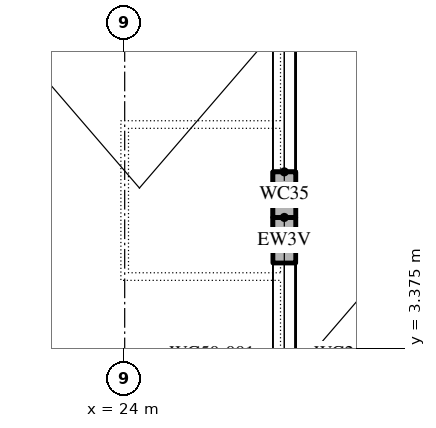
"""IFC4 building model, lengths in metres.
Left out: names, types, materials, properties, quantities, classifications, styles, units other than length and angle.
Written with IfcOpenShell. Run it as: python <this file> out.ifc"""

import sys

from ifc_helpers import new_model, si_unit, direction, frame, frame_2d, origin, place, context, subcontext, project, spatial, polyline, rectangle, outline, extrude, element, fill, save


model = new_model("IFC4")
c1 = context("Model", 3, precision=1e-05, world=origin(), true_north=direction((0.0, 1.0)))
c2 = subcontext(c1, "Body", "Model", "MODEL_VIEW")
j1 = project(units=[si_unit("LENGTHUNIT", "METRE"), si_unit("PLANEANGLEUNIT", "RADIAN")], contexts=[c1])
p1 = place(None, origin())
s1 = spatial("IfcSite", under=j1, at=p1, CompositionType="ELEMENT")
p2 = place(p1, origin())
s2 = spatial("IfcBuilding", under=s1, at=p2, CompositionType="ELEMENT")
p3 = place(p2, frame((0.0, 0.0, 394.2)))
s3 = spatial("IfcBuildingStorey", under=s2, at=p3, CompositionType="ELEMENT", Elevation=394.2)
p4 = place(p3, frame((26.1, -2.1, 0.0), z_axis=(0.0, 0.0, 1.0), x_axis=(0.0, 1.0, 0.0)))
e1 = element("IfcWall", 1, at=p4, inside=s3, PredefinedType="STANDARD", context=c2, shape_type="SweptSolid", body=[
    extrude(rectangle(XDim=7.198, YDim=0.3, at=frame_2d((3.599, 0.0))), origin(), (0.0, 0.0, 1.0), 4.0),
])
p5 = place(p4, frame((0.6, 0.0, 0.8)))
e2 = element("IfcOpeningElement", 2, at=p5, cuts=e1, PredefinedType="OPENING", context=c2, shape_type="SweptSolid", body=[
    extrude(outline(polyline([(0.0, 0.0), (2.4, 0.0), (2.4, 1.25), (2.377, 1.488), (2.31, 1.717), (2.2, 1.929), (2.051, 2.116), (1.87, 2.272), (1.663, 2.391), (1.437, 2.468), (1.2, 2.5), (0.963, 2.468), (0.737, 2.391), (0.53, 2.272), (0.349, 2.116), (0.2, 1.929), (0.09, 1.717), (0.023, 1.488), (0.0, 1.25), (0.0, 0.0)])), frame((0.0, 0.16, 0.0), z_axis=(0.0, -1.0, 0.0), x_axis=(1.0, 0.0, 0.0)), (0.0, 0.0, 1.0), 0.32),
])
p6 = place(p4, frame((4.198, 0.0, 0.8)))
e3 = element("IfcOpeningElement", 3, at=p6, cuts=e1, PredefinedType="OPENING", context=c2, shape_type="SweptSolid", body=[
    extrude(outline(polyline([(0.0, 0.0), (2.4, 0.0), (2.4, 1.25), (2.377, 1.488), (2.31, 1.717), (2.2, 1.929), (2.051, 2.116), (1.87, 2.272), (1.663, 2.391), (1.437, 2.468), (1.2, 2.5), (0.963, 2.468), (0.737, 2.391), (0.53, 2.272), (0.349, 2.116), (0.2, 1.929), (0.09, 1.717), (0.023, 1.488), (0.0, 1.25), (0.0, 0.0)])), frame((0.0, 0.16, 0.0), z_axis=(0.0, -1.0, 0.0), x_axis=(1.0, 0.0, 0.0)), (0.0, 0.0, 1.0), 0.32),
])
p7 = place(p3, frame((26.1, -2.1, 4.0), z_axis=(0.0, 0.0, 1.0), x_axis=(0.0, 1.0, 0.0)))
e4 = element("IfcWall", 4, at=p7, inside=s3, PredefinedType="STANDARD", context=c2, shape_type="SweptSolid", body=[
    extrude(outline(polyline([(0.0, 0.0), (7.198, 0.0), (7.198, 7.809), (0.0, 12.664), (0.0, 0.0)])), frame((0.0, 0.15, 0.0), z_axis=(0.0, -1.0, 0.0), x_axis=(1.0, 0.0, 0.0)), (0.0, 0.0, 1.0), 0.3),
])
p8 = place(p7, frame((0.3, 0.0, 1.0)))
e5 = element("IfcOpeningElement", 5, at=p8, cuts=e4, PredefinedType="OPENING", context=c2, shape_type="SweptSolid", body=[
    extrude(outline(polyline([(0.0, 0.0), (3.0, 0.0), (3.0, 4.902), (2.974, 5.294), (2.898, 5.678), (2.772, 6.05), (2.598, 6.402), (2.38, 6.728), (2.121, 7.023), (1.826, 7.282), (1.5, 7.5), (1.174, 7.282), (0.879, 7.023), (0.62, 6.728), (0.402, 6.402), (0.228, 6.05), (0.102, 5.678), (0.026, 5.294), (0.0, 4.902), (0.0, 0.0)])), frame((0.0, 0.16, 0.0), z_axis=(0.0, -1.0, 0.0), x_axis=(1.0, 0.0, 0.0)), (0.0, 0.0, 1.0), 0.32),
])
p9 = place(p7, frame((3.898, 0.0, 1.0)))
e6 = element("IfcOpeningElement", 6, at=p9, cuts=e4, PredefinedType="OPENING", context=c2, shape_type="SweptSolid", body=[
    extrude(outline(polyline([(0.0, 0.0), (3.0, 0.0), (3.0, 2.5), (2.974, 2.882), (2.897, 3.256), (2.771, 3.617), (2.596, 3.958), (2.378, 4.272), (2.119, 4.553), (1.825, 4.798), (1.5, 5.0), (1.175, 4.798), (0.881, 4.553), (0.622, 4.272), (0.404, 3.958), (0.229, 3.617), (0.103, 3.256), (0.026, 2.882), (0.0, 2.5), (0.0, 0.0)])), frame((0.0, 0.16, 0.0), z_axis=(0.0, -1.0, 0.0), x_axis=(1.0, 0.0, 0.0)), (0.0, 0.0, 1.0), 0.32),
])
p10 = place(p3, frame((26.1, 5.098, 0.0), z_axis=(0.0, 0.0, 1.0), x_axis=(0.0, 1.0, 0.0)))
e7 = element("IfcWall", 7, at=p10, inside=s3, PredefinedType="STANDARD", context=c2, shape_type="SweptSolid", body=[
    extrude(rectangle(XDim=7.198, YDim=0.3, at=frame_2d((3.599, 0.0))), origin(), (0.0, 0.0, 1.0), 4.0),
])
p11 = place(p10, frame((0.6, 0.0, 0.8)))
e8 = element("IfcOpeningElement", 8, at=p11, cuts=e7, PredefinedType="OPENING", context=c2, shape_type="SweptSolid", body=[
    extrude(outline(polyline([(0.0, 0.0), (2.4, 0.0), (2.4, 1.25), (2.377, 1.488), (2.31, 1.717), (2.2, 1.929), (2.051, 2.116), (1.87, 2.272), (1.663, 2.391), (1.437, 2.468), (1.2, 2.5), (0.963, 2.468), (0.737, 2.391), (0.53, 2.272), (0.349, 2.116), (0.2, 1.929), (0.09, 1.717), (0.023, 1.488), (0.0, 1.25), (0.0, 0.0)])), frame((0.0, 0.16, 0.0), z_axis=(0.0, -1.0, 0.0), x_axis=(1.0, 0.0, 0.0)), (0.0, 0.0, 1.0), 0.32),
])
p12 = place(p3, frame((26.1, 5.098, 4.0), z_axis=(0.0, 0.0, 1.0), x_axis=(0.0, 1.0, 0.0)))
e9 = element("IfcWall", 9, at=p12, inside=s3, PredefinedType="STANDARD", context=c2, shape_type="SweptSolid", body=[
    extrude(outline(polyline([(0.0, 0.0), (7.198, 0.0), (7.198, 2.954), (0.0, 7.809), (0.0, 0.0)])), frame((0.0, 0.15, 0.0), z_axis=(0.0, -1.0, 0.0), x_axis=(1.0, 0.0, 0.0)), (0.0, 0.0, 1.0), 0.3),
])
p13 = place(p12, frame((0.6, 0.0, 0.8)))
e10 = element("IfcOpeningElement", 10, at=p13, cuts=e9, PredefinedType="OPENING", context=c2, shape_type="SweptSolid", body=[
    extrude(outline(polyline([(0.0, 0.0), (2.4, 0.0), (2.4, 1.75), (2.379, 2.031), (2.316, 2.305), (2.212, 2.567), (2.071, 2.811), (1.895, 3.031), (1.688, 3.221), (1.454, 3.379), (1.2, 3.5), (0.946, 3.379), (0.712, 3.221), (0.505, 3.031), (0.329, 2.811), (0.188, 2.567), (0.084, 2.305), (0.021, 2.031), (0.0, 1.75), (0.0, 0.0)])), frame((0.0, 0.16, 0.0), z_axis=(0.0, -1.0, 0.0), x_axis=(1.0, 0.0, 0.0)), (0.0, 0.0, 1.0), 0.32),
])
p14 = place(p6, origin())
e11 = element("IfcWindow", 11, at=p14, inside=s3, PartitioningType="DOUBLE_PANEL_VERTICAL", PredefinedType="WINDOW", context=c2, shape_type="SweptSolid", body=[
    extrude(outline(polyline([(0.0, 0.0), (2.4, 0.0), (2.4, 1.25), (2.377, 1.488), (2.31, 1.717), (2.2, 1.929), (2.051, 2.116), (1.87, 2.272), (1.663, 2.391), (1.437, 2.468), (1.2, 2.5), (0.963, 2.468), (0.737, 2.391), (0.53, 2.272), (0.349, 2.116), (0.2, 1.929), (0.09, 1.717), (0.023, 1.488), (0.0, 1.25), (0.0, 0.0)])), frame((0.0, 0.03, 0.0), z_axis=(0.0, -1.0, 0.0), x_axis=(1.0, 0.0, 0.0)), (0.0, 0.0, 1.0), 0.06),
])
fill(e3, e11)
p15 = place(p9, origin())
e12 = element("IfcWindow", 12, at=p15, inside=s3, PartitioningType="DOUBLE_PANEL_VERTICAL", PredefinedType="WINDOW", context=c2, shape_type="SweptSolid", body=[
    extrude(outline(polyline([(0.0, 0.0), (3.0, 0.0), (3.0, 2.5), (2.974, 2.882), (2.897, 3.256), (2.771, 3.617), (2.596, 3.958), (2.378, 4.272), (2.119, 4.553), (1.825, 4.798), (1.5, 5.0), (1.175, 4.798), (0.881, 4.553), (0.622, 4.272), (0.404, 3.958), (0.229, 3.617), (0.103, 3.256), (0.026, 2.882), (0.0, 2.5), (0.0, 0.0)])), frame((0.0, 0.03, 0.0), z_axis=(0.0, -1.0, 0.0), x_axis=(1.0, 0.0, 0.0)), (0.0, 0.0, 1.0), 0.06),
])
fill(e6, e12)
p16 = place(p11, origin())
e13 = element("IfcWindow", 13, at=p16, inside=s3, PartitioningType="DOUBLE_PANEL_VERTICAL", PredefinedType="WINDOW", context=c2, shape_type="SweptSolid", body=[
    extrude(outline(polyline([(0.0, 0.0), (2.4, 0.0), (2.4, 1.25), (2.377, 1.488), (2.31, 1.717), (2.2, 1.929), (2.051, 2.116), (1.87, 2.272), (1.663, 2.391), (1.437, 2.468), (1.2, 2.5), (0.963, 2.468), (0.737, 2.391), (0.53, 2.272), (0.349, 2.116), (0.2, 1.929), (0.09, 1.717), (0.023, 1.488), (0.0, 1.25), (0.0, 0.0)])), frame((0.0, 0.03, 0.0), z_axis=(0.0, -1.0, 0.0), x_axis=(1.0, 0.0, 0.0)), (0.0, 0.0, 1.0), 0.06),
])
fill(e8, e13)
p17 = place(p13, origin())
e14 = element("IfcWindow", 14, at=p17, inside=s3, PartitioningType="DOUBLE_PANEL_VERTICAL", PredefinedType="WINDOW", context=c2, shape_type="SweptSolid", body=[
    extrude(outline(polyline([(0.0, 0.0), (2.4, 0.0), (2.4, 1.75), (2.379, 2.031), (2.316, 2.305), (2.212, 2.567), (2.071, 2.811), (1.895, 3.031), (1.688, 3.221), (1.454, 3.379), (1.2, 3.5), (0.946, 3.379), (0.712, 3.221), (0.505, 3.031), (0.329, 2.811), (0.188, 2.567), (0.084, 2.305), (0.021, 2.031), (0.0, 1.75), (0.0, 0.0)])), frame((0.0, 0.03, 0.0), z_axis=(0.0, -1.0, 0.0), x_axis=(1.0, 0.0, 0.0)), (0.0, 0.0, 1.0), 0.06),
])
fill(e10, e14)
save(model, sys.argv[1])
